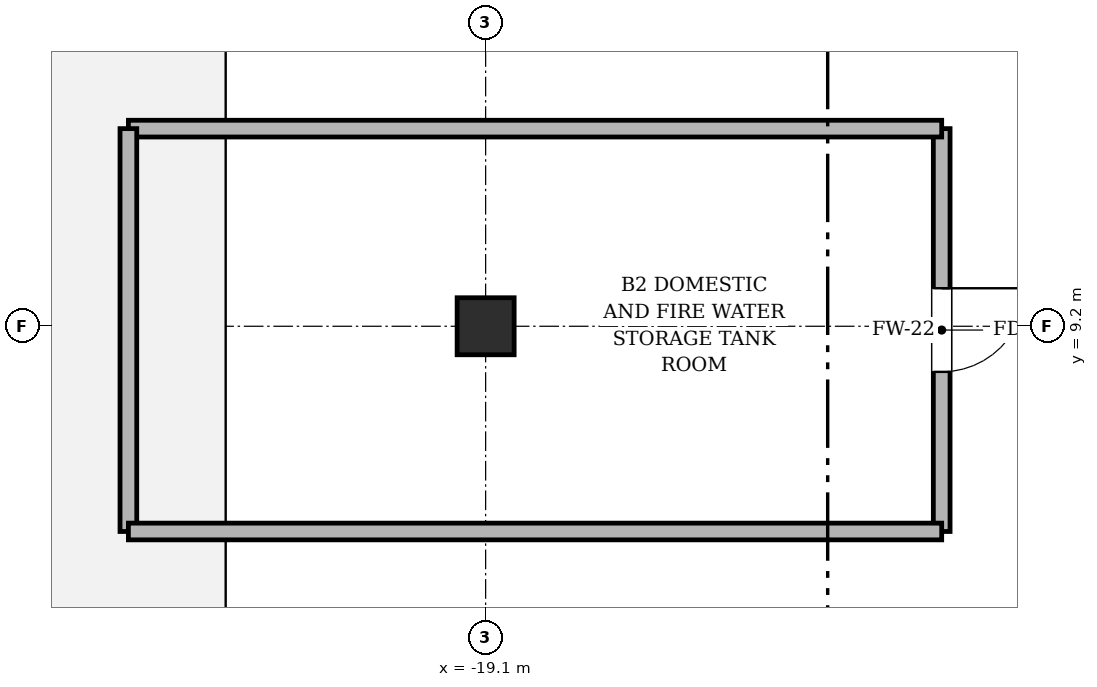
"""IFC4 building model, lengths in metres.
Left out: names, types, materials, properties, quantities, classifications, styles, units other than length and angle.
Written with IfcOpenShell. Run it as: python <this file> out.ifc"""

import sys

from ifc_helpers import new_model, si_unit, direction, frame, frame_2d, origin, origin_2d, place, context, subcontext, project, spatial, rectangle, circle, extrude, element, fill, save


model = new_model("IFC4")
c1 = context("Model", 3, precision=1e-05, world=origin(), true_north=direction((0.0, 1.0)))
c2 = subcontext(c1, "Body", "Model", "MODEL_VIEW")
j1 = project(units=[si_unit("LENGTHUNIT", "METRE"), si_unit("PLANEANGLEUNIT", "RADIAN")], contexts=[c1])
p1 = place(None, origin())
s1 = spatial("IfcSite", under=j1, at=p1, CompositionType="ELEMENT")
p2 = place(p1, origin())
s2 = spatial("IfcBuilding", under=s1, at=p2, CompositionType="ELEMENT")
p3 = place(p2, frame((0.0, 0.0, -9.6)))
s3 = spatial("IfcBuildingStorey", under=s2, at=p3, CompositionType="ELEMENT", Elevation=-9.6)
p4 = place(p3, frame((-19.1, 9.2, 0.0), z_axis=(0.0, 0.0, 1.0), x_axis=(1.0, 0.0, 0.0)))
e1 = element("IfcColumn", 1, at=p4, inside=s3, PredefinedType="PILASTER", context=c2, shape_type="SweptSolid", body=[
    extrude(circle(Radius=0.375, at=origin_2d()), origin(), (0.0, 0.0, 1.0), 4.8),
])
p5 = place(p3, frame((-13.1, 6.5, 0.0), z_axis=(0.0, 0.0, 1.0), x_axis=(0.0, 1.0, 0.0)))
e2 = element("IfcWall", 2, at=p5, inside=s3, PredefinedType="SOLIDWALL", context=c2, shape_type="SweptSolid", body=[
    extrude(rectangle(XDim=5.3, YDim=0.22, at=frame_2d((2.65, 0.0))), origin(), (0.0, 0.0, 1.0), 3.814),
])
p6 = place(p5, frame((2.1, 0.0, 0.0)))
e3 = element("IfcOpeningElement", 3, at=p6, cuts=e2, PredefinedType="OPENING", context=c2, shape_type="SweptSolid", body=[
    extrude(rectangle(XDim=1.1, YDim=2.2, at=frame_2d((0.55, 1.1))), frame((0.0, 0.12, 0.0), z_axis=(0.0, -1.0, 0.0), x_axis=(1.0, 0.0, 0.0)), (0.0, 0.0, 1.0), 0.24),
])
p7 = place(p3, frame((-13.1, 11.8, 0.0), z_axis=(0.0, 0.0, 1.0), x_axis=(-1.0, 0.0, 0.0)))
e4 = element("IfcWall", 4, at=p7, inside=s3, PredefinedType="SOLIDWALL", context=c2, shape_type="SweptSolid", body=[
    extrude(rectangle(XDim=10.7, YDim=0.22, at=frame_2d((5.35, 0.0))), origin(), (0.0, 0.0, 1.0), 3.814),
])
p8 = place(p3, frame((-23.8, 11.8, 0.0), z_axis=(0.0, 0.0, 1.0), x_axis=(0.0, -1.0, 0.0)))
e5 = element("IfcWall", 5, at=p8, inside=s3, PredefinedType="SOLIDWALL", context=c2, shape_type="SweptSolid", body=[
    extrude(rectangle(XDim=5.3, YDim=0.22, at=frame_2d((2.65, 0.0))), origin(), (0.0, 0.0, 1.0), 3.814),
])
p9 = place(p3, frame((-23.8, 6.5, 0.0), z_axis=(0.0, 0.0, 1.0), x_axis=(1.0, 0.0, 0.0)))
e6 = element("IfcWall", 6, at=p9, inside=s3, PredefinedType="SOLIDWALL", context=c2, shape_type="SweptSolid", body=[
    extrude(rectangle(XDim=10.7, YDim=0.22, at=frame_2d((5.35, 0.0))), origin(), (0.0, 0.0, 1.0), 3.814),
])
p10 = place(p6, origin())
e7 = element("IfcDoor", 7, at=p10, inside=s3, OperationType="SINGLE_SWING_RIGHT", PredefinedType="DOOR", context=c2, shape_type="SweptSolid", body=[
    extrude(rectangle(XDim=1.1, YDim=2.2, at=frame_2d((0.55, 1.1))), frame((0.0, 0.025, 0.0), z_axis=(0.0, -1.0, 0.0), x_axis=(1.0, 0.0, 0.0)), (0.0, 0.0, 1.0), 0.05),
])
fill(e3, e7)
save(model, sys.argv[1])
